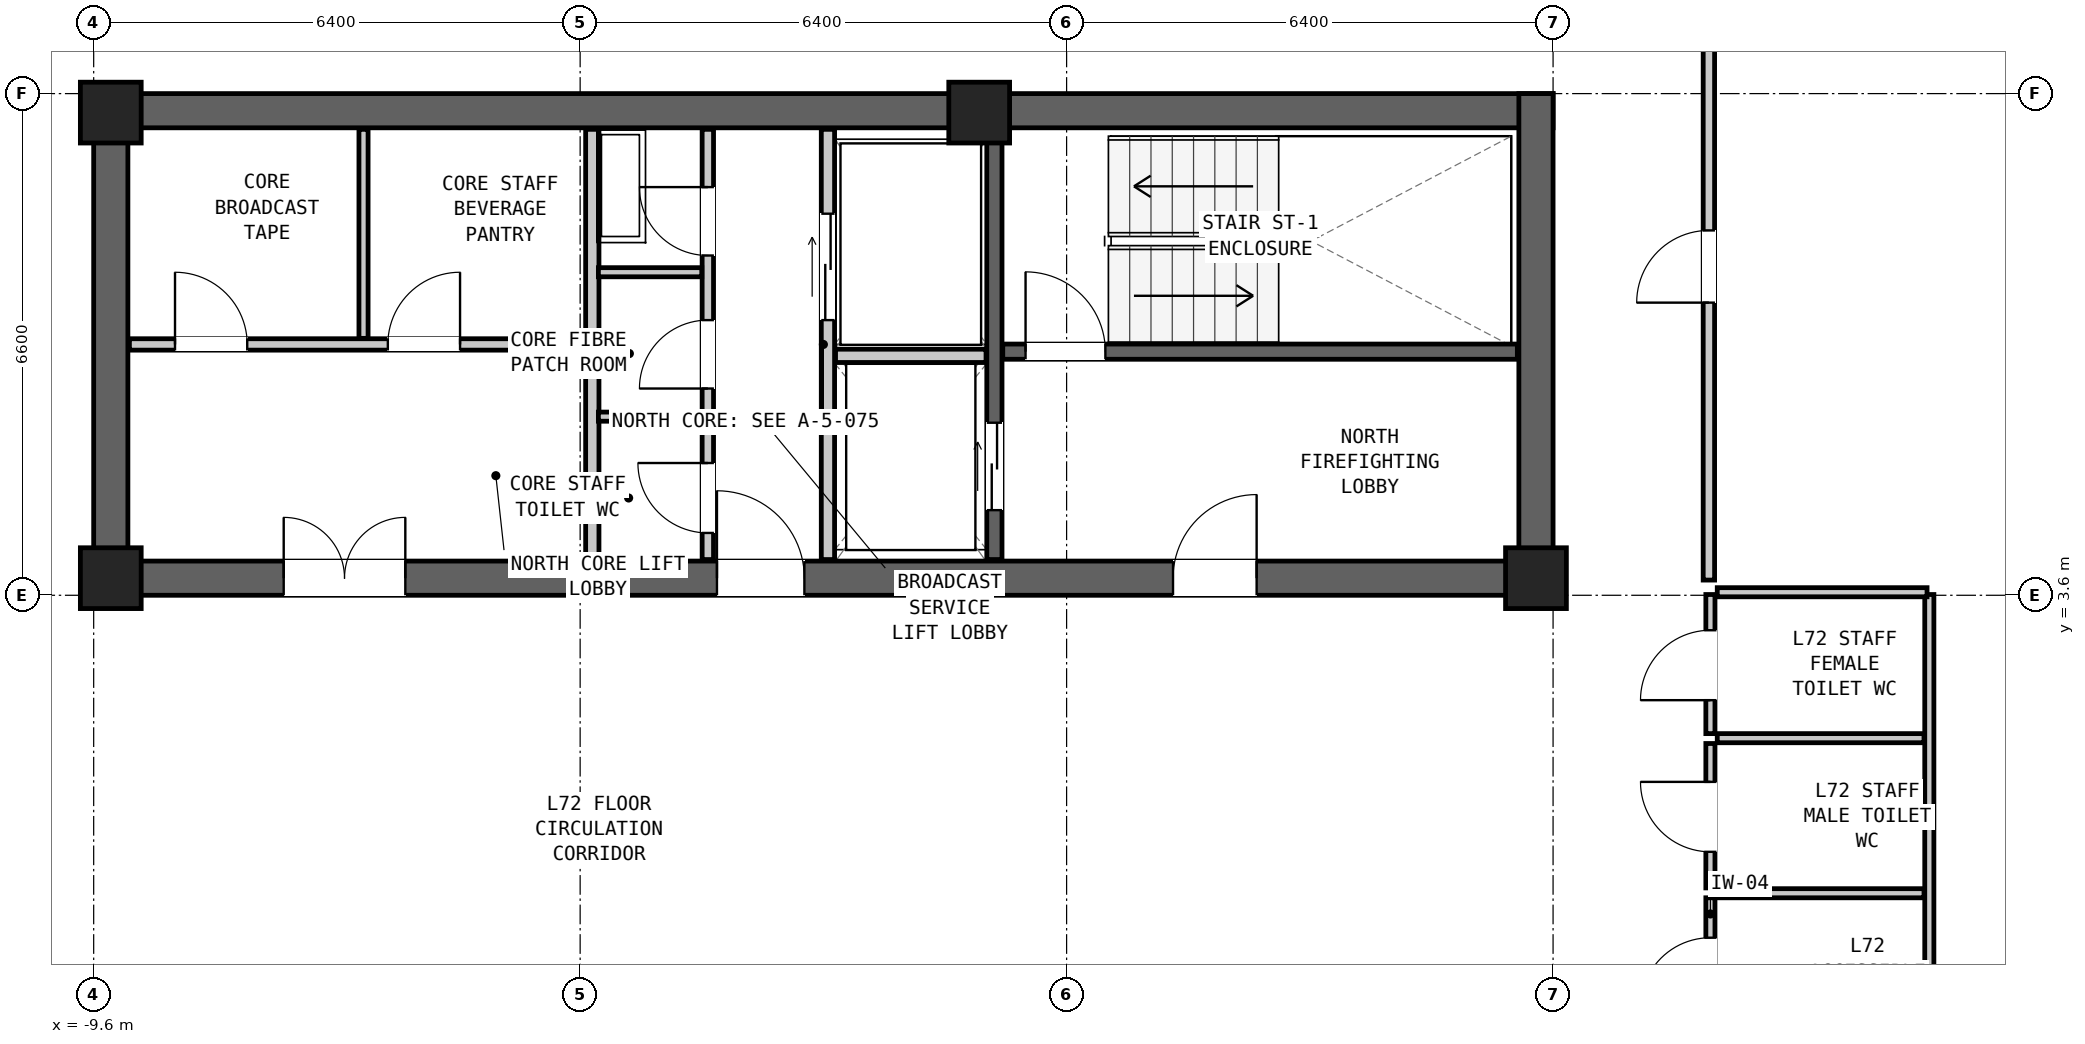
"""IFC4 building model, lengths in metres.
Left out: names, types, materials, properties, quantities, classifications, styles, units other than length and angle.
Written with IfcOpenShell. Run it as: python <this file> out.ifc"""

import sys

from ifc_helpers import new_model, si_unit, direction, frame, frame_2d, origin, origin_2d, place, context, subcontext, project, spatial, rectangle, extrude, element, fill, save


model = new_model("IFC4")
c1 = context("Model", 3, precision=1e-05, world=origin(), true_north=direction((0.0, 1.0)))
c2 = subcontext(c1, "Body", "Model", "MODEL_VIEW")
j1 = project(units=[si_unit("LENGTHUNIT", "METRE"), si_unit("PLANEANGLEUNIT", "RADIAN")], contexts=[c1])
p1 = place(None, origin())
s1 = spatial("IfcSite", under=j1, at=p1, CompositionType="ELEMENT")
p2 = place(p1, origin())
s2 = spatial("IfcBuilding", under=s1, at=p2, CompositionType="ELEMENT")
p3 = place(p2, frame((0.0, 0.0, 245.9)))
s3 = spatial("IfcBuildingStorey", under=s2, at=p3, CompositionType="ELEMENT", Elevation=245.9)
p4 = place(p3, frame((-9.6, 9.975, 0.0), z_axis=(0.0, 0.0, 1.0), x_axis=(1.0, 0.0, 0.0)))
e1 = element("IfcWall", 1, at=p4, inside=s3, PredefinedType="SHEAR", context=c2, shape_type="SweptSolid", body=[
    extrude(rectangle(XDim=19.2, YDim=0.45, at=frame_2d((9.6, 0.0))), origin(), (0.0, 0.0, 1.0), 3.05),
])
p5 = place(p3, frame((-9.6, 3.825, 0.0), z_axis=(0.0, 0.0, 1.0), x_axis=(1.0, 0.0, 0.0)))
e2 = element("IfcWall", 2, at=p5, inside=s3, PredefinedType="SHEAR", context=c2, shape_type="SweptSolid", body=[
    extrude(rectangle(XDim=19.2, YDim=0.45, at=frame_2d((9.6, 0.0))), origin(), (0.0, 0.0, 1.0), 3.05),
])
p6 = place(p5, frame((14.2, 0.0, 0.0)))
e3 = element("IfcOpeningElement", 3, at=p6, cuts=e2, PredefinedType="OPENING", context=c2, shape_type="SweptSolid", body=[
    extrude(rectangle(XDim=1.1, YDim=2.08, at=frame_2d((0.55, 1.04))), frame((0.0, 0.237, 0.0), z_axis=(0.0, -1.0, 0.0), x_axis=(1.0, 0.0, 0.0)), (0.0, 0.0, 1.0), 0.474),
])
p7 = place(p5, frame((8.2, 0.0, 0.0)))
e4 = element("IfcOpeningElement", 4, at=p7, cuts=e2, PredefinedType="OPENING", context=c2, shape_type="SweptSolid", body=[
    extrude(rectangle(XDim=1.15, YDim=2.1, at=frame_2d((0.575, 1.05))), frame((0.0, 0.237, 0.0), z_axis=(0.0, -1.0, 0.0), x_axis=(1.0, 0.0, 0.0)), (0.0, 0.0, 1.0), 0.474),
])
p8 = place(p5, frame((2.5, 0.0, 0.0)))
e5 = element("IfcOpeningElement", 5, at=p8, cuts=e2, PredefinedType="OPENING", context=c2, shape_type="SweptSolid", body=[
    extrude(rectangle(XDim=1.6, YDim=2.12, at=frame_2d((0.8, 1.06))), frame((0.0, 0.237, 0.0), z_axis=(0.0, -1.0, 0.0), x_axis=(1.0, 0.0, 0.0)), (0.0, 0.0, 1.0), 0.474),
])
for number, where, z_axis, x_axis in (
    (6, (-9.375, 3.6, 0.0), (0.0, 0.0, 1.0), (0.0, 1.0, 0.0)),
    (7, (9.375, 3.6, 0.0), (0.0, 0.0, 1.0), (0.0, 1.0, 0.0)),
):
    element("IfcWall", number, at=place(p3, frame(where, z_axis=z_axis, x_axis=x_axis)), inside=s3, PredefinedType="SHEAR", context=c2, shape_type="SweptSolid", body=[
        extrude(rectangle(XDim=6.6, YDim=0.45, at=frame_2d((3.3, 0.0))), origin(), (0.0, 0.0, 1.0), 3.05),
    ])
for number, where, z_axis, x_axis in (
    (8, (-9.375, 9.95, 0.0), (0.0, 0.0, 1.0), (1.0, 0.0, 0.0)),
    (9, (2.05, 9.95, 0.0), (0.0, 0.0, 1.0), (1.0, 0.0, 0.0)),
    (10, (-9.375, 3.825, 0.0), (0.0, 0.0, 1.0), (1.0, 0.0, 0.0)),
    (11, (9.375, 3.825, 0.0), (0.0, 0.0, 1.0), (1.0, 0.0, 0.0)),
):
    element("IfcColumn", number, at=place(p3, frame(where, z_axis=z_axis, x_axis=x_axis)), inside=s3, PredefinedType="COLUMN", context=c2, shape_type="SweptSolid", body=[
        extrude(rectangle(XDim=0.8, YDim=0.8, at=origin_2d()), origin(), (0.0, 0.0, 1.0), 3.05),
    ])
p9 = place(p3, frame((2.36, 6.805, 0.0), z_axis=(0.0, 0.0, 1.0), x_axis=(1.0, 0.0, 0.0)))
e12 = element("IfcWall", 12, at=p9, inside=s3, PredefinedType="SHEAR", context=c2, shape_type="SweptSolid", body=[
    extrude(rectangle(XDim=6.77, YDim=0.2, at=frame_2d((3.385, 0.0))), origin(), (0.0, 0.0, 1.0), 2.86),
])
p10 = place(p9, frame((0.3, 0.0, 0.0)))
e13 = element("IfcOpeningElement", 13, at=p10, cuts=e12, PredefinedType="OPENING", context=c2, shape_type="SweptSolid", body=[
    extrude(rectangle(XDim=1.05, YDim=2.08, at=frame_2d((0.525, 1.04))), frame((0.0, 0.112, 0.0), z_axis=(0.0, -1.0, 0.0), x_axis=(1.0, 0.0, 0.0)), (0.0, 0.0, 1.0), 0.224),
])
p11 = place(p3, frame((2.25, 4.07, 0.0), z_axis=(0.0, 0.0, 1.0), x_axis=(0.0, 1.0, 0.0)))
e14 = element("IfcWall", 14, at=p11, inside=s3, PredefinedType="SHEAR", context=c2, shape_type="SweptSolid", body=[
    extrude(rectangle(XDim=5.66, YDim=0.2, at=frame_2d((2.83, 0.0))), origin(), (0.0, 0.0, 1.0), 2.86),
])
p12 = place(p11, frame((0.65, 0.0, 0.0)))
e15 = element("IfcOpeningElement", 15, at=p12, cuts=e14, PredefinedType="OPENING", context=c2, shape_type="SweptSolid", body=[
    extrude(rectangle(XDim=1.15, YDim=2.08, at=frame_2d((0.575, 1.04))), frame((0.0, 0.112, 0.0), z_axis=(0.0, -1.0, 0.0), x_axis=(1.0, 0.0, 0.0)), (0.0, 0.0, 1.0), 0.224),
])
p13 = place(p3, frame((0.06, 4.07, 0.0), z_axis=(0.0, 0.0, 1.0), x_axis=(0.0, 1.0, 0.0)))
e16 = element("IfcWall", 16, at=p13, inside=s3, PredefinedType="PARTITIONING", context=c2, shape_type="SweptSolid", body=[
    extrude(rectangle(XDim=5.66, YDim=0.175, at=frame_2d((2.83, 0.0))), origin(), (0.0, 0.0, 1.0), 2.86),
])
p14 = place(p13, frame((3.15, 0.0, 0.0)))
e17 = element("IfcOpeningElement", 17, at=p14, cuts=e16, PredefinedType="OPENING", context=c2, shape_type="SweptSolid", body=[
    extrude(rectangle(XDim=1.4, YDim=2.12, at=frame_2d((0.7, 1.06))), frame((0.0, 0.1, 0.0), z_axis=(0.0, -1.0, 0.0), x_axis=(1.0, 0.0, 0.0)), (0.0, 0.0, 1.0), 0.199),
])
p15 = place(p3, frame((0.16, 6.75, 0.0), z_axis=(0.0, 0.0, 1.0), x_axis=(1.0, 0.0, 0.0)))
e18 = element("IfcWall", 18, at=p15, inside=s3, PredefinedType="PARTITIONING", context=c2, shape_type="SweptSolid", body=[
    extrude(rectangle(XDim=1.98, YDim=0.175, at=frame_2d((0.99, 0.0))), origin(), (0.0, 0.0, 1.0), 2.86),
])
p16 = place(p3, frame((-3.04, 4.07, 0.0), z_axis=(0.0, 0.0, 1.0), x_axis=(0.0, 1.0, 0.0)))
e19 = element("IfcWall", 19, at=p16, inside=s3, PredefinedType="PARTITIONING", context=c2, shape_type="SweptSolid", body=[
    extrude(rectangle(XDim=5.66, YDim=0.175, at=frame_2d((2.83, 0.0))), origin(), (0.0, 0.0, 1.0), 2.86),
])
p17 = place(p3, frame((-1.52, 4.07, 0.0), z_axis=(0.0, 0.0, 1.0), x_axis=(0.0, 1.0, 0.0)))
e20 = element("IfcWall", 20, at=p17, inside=s3, PredefinedType="PARTITIONING", context=c2, shape_type="SweptSolid", body=[
    extrude(rectangle(XDim=5.66, YDim=0.15, at=frame_2d((2.83, 0.0))), origin(), (0.0, 0.0, 1.0), 2.86),
])
p18 = place(p17, frame((4.0, 0.0, 0.0)))
e21 = element("IfcOpeningElement", 21, at=p18, cuts=e20, PredefinedType="OPENING", context=c2, shape_type="SweptSolid", body=[
    extrude(rectangle(XDim=0.9, YDim=2.05, at=frame_2d((0.45, 1.025))), frame((0.0, 0.087, 0.0), z_axis=(0.0, -1.0, 0.0), x_axis=(1.0, 0.0, 0.0)), (0.0, 0.0, 1.0), 0.174),
])
p19 = place(p17, frame((2.25, 0.0, 0.0)))
e22 = element("IfcOpeningElement", 22, at=p19, cuts=e20, PredefinedType="OPENING", context=c2, shape_type="SweptSolid", body=[
    extrude(rectangle(XDim=0.9, YDim=2.05, at=frame_2d((0.45, 1.025))), frame((0.0, 0.087, 0.0), z_axis=(0.0, -1.0, 0.0), x_axis=(1.0, 0.0, 0.0)), (0.0, 0.0, 1.0), 0.174),
])
p20 = place(p17, frame((0.35, 0.0, 0.0)))
e23 = element("IfcOpeningElement", 23, at=p20, cuts=e20, PredefinedType="OPENING", context=c2, shape_type="SweptSolid", body=[
    extrude(rectangle(XDim=0.92, YDim=2.1, at=frame_2d((0.46, 1.05))), frame((0.0, 0.087, 0.0), z_axis=(0.0, -1.0, 0.0), x_axis=(1.0, 0.0, 0.0)), (0.0, 0.0, 1.0), 0.174),
])
for number, where, z_axis, x_axis in (
    (24, (-2.96, 5.95, 0.0), (0.0, 0.0, 1.0), (1.0, 0.0, 0.0)),
    (25, (-2.96, 7.85, 0.0), (0.0, 0.0, 1.0), (1.0, 0.0, 0.0)),
):
    element("IfcWall", number, at=place(p3, frame(where, z_axis=z_axis, x_axis=x_axis)), inside=s3, PredefinedType="PARTITIONING", context=c2, shape_type="SweptSolid", body=[
        extrude(rectangle(XDim=1.36, YDim=0.12, at=frame_2d((0.68, 0.0))), origin(), (0.0, 0.0, 1.0), 2.86),
    ])
p21 = place(p3, frame((-9.13, 6.9, 0.0), z_axis=(0.0, 0.0, 1.0), x_axis=(1.0, 0.0, 0.0)))
e26 = element("IfcWall", 26, at=p21, inside=s3, PredefinedType="PARTITIONING", context=c2, shape_type="SweptSolid", body=[
    extrude(rectangle(XDim=6.01, YDim=0.15, at=frame_2d((3.005, 0.0))), origin(), (0.0, 0.0, 1.0), 2.86),
])
p22 = place(p21, frame((0.6, 0.0, 0.0)))
e27 = element("IfcOpeningElement", 27, at=p22, cuts=e26, PredefinedType="OPENING", context=c2, shape_type="SweptSolid", body=[
    extrude(rectangle(XDim=0.95, YDim=2.1, at=frame_2d((0.475, 1.05))), frame((0.0, 0.087, 0.0), z_axis=(0.0, -1.0, 0.0), x_axis=(1.0, 0.0, 0.0)), (0.0, 0.0, 1.0), 0.174),
])
p23 = place(p21, frame((3.4, 0.0, 0.0)))
e28 = element("IfcOpeningElement", 28, at=p23, cuts=e26, PredefinedType="OPENING", context=c2, shape_type="SweptSolid", body=[
    extrude(rectangle(XDim=0.95, YDim=2.1, at=frame_2d((0.475, 1.05))), frame((0.0, 0.087, 0.0), z_axis=(0.0, -1.0, 0.0), x_axis=(1.0, 0.0, 0.0)), (0.0, 0.0, 1.0), 0.174),
])
p24 = place(p3, frame((-6.05, 6.98, 0.0), z_axis=(0.0, 0.0, 1.0), x_axis=(0.0, 1.0, 0.0)))
e29 = element("IfcWall", 29, at=p24, inside=s3, PredefinedType="PARTITIONING", context=c2, shape_type="SweptSolid", body=[
    extrude(rectangle(XDim=2.75, YDim=0.12, at=frame_2d((1.375, 0.0))), origin(), (0.0, 0.0, 1.0), 2.86),
])
p25 = place(p3, frame((11.67, -2.32, 0.0), z_axis=(0.0, 0.0, 1.0), x_axis=(0.0, 1.0, 0.0)))
e30 = element("IfcWall", 30, at=p25, inside=s3, PredefinedType="PARTITIONING", context=c2, shape_type="SweptSolid", body=[
    extrude(rectangle(XDim=1.94, YDim=0.12, at=frame_2d((0.97, 0.0))), origin(), (0.0, 0.0, 1.0), 2.86),
])
p26 = place(p25, frame((0.495, 0.0, 0.0)))
e31 = element("IfcOpeningElement", 31, at=p26, cuts=e30, PredefinedType="OPENING", context=c2, shape_type="SweptSolid", body=[
    extrude(rectangle(XDim=0.92, YDim=2.1, at=frame_2d((0.46, 1.05))), frame((0.0, 0.072, 0.0), z_axis=(0.0, -1.0, 0.0), x_axis=(1.0, 0.0, 0.0)), (0.0, 0.0, 1.0), 0.144),
])
p27 = place(p3, frame((11.67, -0.25, 0.0), z_axis=(0.0, 0.0, 1.0), x_axis=(0.0, 1.0, 0.0)))
e32 = element("IfcWall", 32, at=p27, inside=s3, PredefinedType="PARTITIONING", context=c2, shape_type="SweptSolid", body=[
    extrude(rectangle(XDim=1.9, YDim=0.12, at=frame_2d((0.95, 0.0))), origin(), (0.0, 0.0, 1.0), 2.86),
])
p28 = place(p27, frame((0.475, 0.0, 0.0)))
e33 = element("IfcOpeningElement", 33, at=p28, cuts=e32, PredefinedType="OPENING", context=c2, shape_type="SweptSolid", body=[
    extrude(rectangle(XDim=0.92, YDim=2.1, at=frame_2d((0.46, 1.05))), frame((0.0, 0.072, 0.0), z_axis=(0.0, -1.0, 0.0), x_axis=(1.0, 0.0, 0.0)), (0.0, 0.0, 1.0), 0.144),
])
p29 = place(p3, frame((11.67, 1.78, 0.0), z_axis=(0.0, 0.0, 1.0), x_axis=(0.0, 1.0, 0.0)))
e34 = element("IfcWall", 34, at=p29, inside=s3, PredefinedType="PARTITIONING", context=c2, shape_type="SweptSolid", body=[
    extrude(rectangle(XDim=1.83, YDim=0.12, at=frame_2d((0.915, 0.0))), origin(), (0.0, 0.0, 1.0), 2.86),
])
p30 = place(p29, frame((0.44, 0.0, 0.0)))
e35 = element("IfcOpeningElement", 35, at=p30, cuts=e34, PredefinedType="OPENING", context=c2, shape_type="SweptSolid", body=[
    extrude(rectangle(XDim=0.92, YDim=2.1, at=frame_2d((0.46, 1.05))), frame((0.0, 0.072, 0.0), z_axis=(0.0, -1.0, 0.0), x_axis=(1.0, 0.0, 0.0)), (0.0, 0.0, 1.0), 0.144),
])
p31 = place(p3, frame((14.55, -2.32, 0.0), z_axis=(0.0, 0.0, 1.0), x_axis=(0.0, 1.0, 0.0)))
e36 = element("IfcWall", 36, at=p31, inside=s3, PredefinedType="PARTITIONING", context=c2, shape_type="SweptSolid", body=[
    extrude(rectangle(XDim=5.93, YDim=0.12, at=frame_2d((2.965, 0.0))), origin(), (0.0, 0.0, 1.0), 2.86),
])
p32 = place(p3, frame((11.76, 3.64, 0.0), z_axis=(0.0, 0.0, 1.0), x_axis=(1.0, 0.0, 0.0)))
e37 = element("IfcWall", 37, at=p32, inside=s3, PredefinedType="PARTITIONING", context=c2, shape_type="SweptSolid", body=[
    extrude(rectangle(XDim=2.76, YDim=0.12, at=frame_2d((1.38, 0.0))), origin(), (0.0, 0.0, 1.0), 1.981),
])
for number, where, z_axis, x_axis in (
    (38, (11.76, -0.32, 0.0), (0.0, 0.0, 1.0), (1.0, 0.0, 0.0)),
    (39, (11.76, 1.72, 0.0), (0.0, 0.0, 1.0), (1.0, 0.0, 0.0)),
):
    element("IfcWall", number, at=place(p3, frame(where, z_axis=z_axis, x_axis=x_axis)), inside=s3, PredefinedType="PARTITIONING", context=c2, shape_type="SweptSolid", body=[
        extrude(rectangle(XDim=2.72, YDim=0.12, at=frame_2d((1.36, 0.0))), origin(), (0.0, 0.0, 1.0), 2.86),
    ])
p33 = place(p3, frame((11.65, 3.8, 0.0), z_axis=(0.0, 0.0, 1.0), x_axis=(0.0, 1.0, 0.0)))
e40 = element("IfcWall", 40, at=p33, inside=s3, PredefinedType="PARTITIONING", context=c2, shape_type="SweptSolid", body=[
    extrude(rectangle(XDim=8.25, YDim=0.15, at=frame_2d((4.125, 0.0))), origin(), (0.0, 0.0, 1.0), 2.86),
])
p34 = place(p33, frame((3.65, 0.0, 0.0)))
e41 = element("IfcOpeningElement", 41, at=p34, cuts=e40, PredefinedType="OPENING", context=c2, shape_type="SweptSolid", body=[
    extrude(rectangle(XDim=0.95, YDim=2.1, at=frame_2d((0.475, 1.05))), frame((0.0, 0.087, 0.0), z_axis=(0.0, -1.0, 0.0), x_axis=(1.0, 0.0, 0.0)), (0.0, 0.0, 1.0), 0.174),
])
p35 = place(p10, origin())
e42 = element("IfcDoor", 42, at=p35, inside=s3, OperationType="SINGLE_SWING_LEFT", PredefinedType="DOOR", context=c2, shape_type="SweptSolid", body=[
    extrude(rectangle(XDim=1.05, YDim=2.08, at=frame_2d((0.525, 1.04))), frame((0.0, 0.025, 0.0), z_axis=(0.0, -1.0, 0.0), x_axis=(1.0, 0.0, 0.0)), (0.0, 0.0, 1.0), 0.05),
])
fill(e13, e42)
p36 = place(p6, origin())
e43 = element("IfcDoor", 43, at=p36, inside=s3, OperationType="SINGLE_SWING_RIGHT", PredefinedType="DOOR", context=c2, shape_type="SweptSolid", body=[
    extrude(rectangle(XDim=1.1, YDim=2.08, at=frame_2d((0.55, 1.04))), frame((0.0, 0.025, 0.0), z_axis=(0.0, -1.0, 0.0), x_axis=(1.0, 0.0, 0.0)), (0.0, 0.0, 1.0), 0.05),
])
fill(e3, e43)
p37 = place(p12, origin())
e44 = element("IfcDoor", 44, at=p37, inside=s3, OperationType="DOUBLE_DOOR_SLIDING", PredefinedType="DOOR", context=c2, shape_type="SweptSolid", body=[
    extrude(rectangle(XDim=1.15, YDim=2.08, at=frame_2d((0.575, 1.04))), frame((0.0, 0.025, 0.0), z_axis=(0.0, -1.0, 0.0), x_axis=(1.0, 0.0, 0.0)), (0.0, 0.0, 1.0), 0.05),
])
fill(e15, e44)
p38 = place(p14, origin())
e45 = element("IfcDoor", 45, at=p38, inside=s3, OperationType="DOUBLE_DOOR_SLIDING", PredefinedType="DOOR", context=c2, shape_type="SweptSolid", body=[
    extrude(rectangle(XDim=1.4, YDim=2.12, at=frame_2d((0.7, 1.06))), frame((0.0, 0.025, 0.0), z_axis=(0.0, -1.0, 0.0), x_axis=(1.0, 0.0, 0.0)), (0.0, 0.0, 1.0), 0.05),
])
fill(e17, e45)
p39 = place(p7, origin())
e46 = element("IfcDoor", 46, at=p39, inside=s3, OperationType="SINGLE_SWING_LEFT", PredefinedType="DOOR", context=c2, shape_type="SweptSolid", body=[
    extrude(rectangle(XDim=1.15, YDim=2.1, at=frame_2d((0.575, 1.05))), frame((0.0, 0.025, 0.0), z_axis=(0.0, -1.0, 0.0), x_axis=(1.0, 0.0, 0.0)), (0.0, 0.0, 1.0), 0.05),
])
fill(e4, e46)
p40 = place(p18, origin())
e47 = element("IfcDoor", 47, at=p40, inside=s3, OperationType="SINGLE_SWING_RIGHT", PredefinedType="DOOR", context=c2, shape_type="SweptSolid", body=[
    extrude(rectangle(XDim=0.9, YDim=2.05, at=frame_2d((0.45, 1.025))), frame((0.0, 0.025, 0.0), z_axis=(0.0, -1.0, 0.0), x_axis=(1.0, 0.0, 0.0)), (0.0, 0.0, 1.0), 0.05),
])
fill(e21, e47)
p41 = place(p19, origin())
e48 = element("IfcDoor", 48, at=p41, inside=s3, OperationType="SINGLE_SWING_LEFT", PredefinedType="DOOR", context=c2, shape_type="SweptSolid", body=[
    extrude(rectangle(XDim=0.9, YDim=2.05, at=frame_2d((0.45, 1.025))), frame((0.0, 0.025, 0.0), z_axis=(0.0, -1.0, 0.0), x_axis=(1.0, 0.0, 0.0)), (0.0, 0.0, 1.0), 0.05),
])
fill(e22, e48)
p42 = place(p20, origin())
e49 = element("IfcDoor", 49, at=p42, inside=s3, OperationType="SINGLE_SWING_RIGHT", PredefinedType="DOOR", context=c2, shape_type="SweptSolid", body=[
    extrude(rectangle(XDim=0.92, YDim=2.1, at=frame_2d((0.46, 1.05))), frame((0.0, 0.025, 0.0), z_axis=(0.0, -1.0, 0.0), x_axis=(1.0, 0.0, 0.0)), (0.0, 0.0, 1.0), 0.05),
])
fill(e23, e49)
p43 = place(p8, origin())
e50 = element("IfcDoor", 50, at=p43, inside=s3, OperationType="DOUBLE_DOOR_SINGLE_SWING", PredefinedType="DOOR", context=c2, shape_type="SweptSolid", body=[
    extrude(rectangle(XDim=1.6, YDim=2.12, at=frame_2d((0.8, 1.06))), frame((0.0, 0.025, 0.0), z_axis=(0.0, -1.0, 0.0), x_axis=(1.0, 0.0, 0.0)), (0.0, 0.0, 1.0), 0.05),
])
fill(e5, e50)
p44 = place(p22, origin())
e51 = element("IfcDoor", 51, at=p44, inside=s3, OperationType="SINGLE_SWING_LEFT", PredefinedType="DOOR", context=c2, shape_type="SweptSolid", body=[
    extrude(rectangle(XDim=0.95, YDim=2.1, at=frame_2d((0.475, 1.05))), frame((0.0, 0.025, 0.0), z_axis=(0.0, -1.0, 0.0), x_axis=(1.0, 0.0, 0.0)), (0.0, 0.0, 1.0), 0.05),
])
fill(e27, e51)
p45 = place(p23, origin())
e52 = element("IfcDoor", 52, at=p45, inside=s3, OperationType="SINGLE_SWING_RIGHT", PredefinedType="DOOR", context=c2, shape_type="SweptSolid", body=[
    extrude(rectangle(XDim=0.95, YDim=2.1, at=frame_2d((0.475, 1.05))), frame((0.0, 0.025, 0.0), z_axis=(0.0, -1.0, 0.0), x_axis=(1.0, 0.0, 0.0)), (0.0, 0.0, 1.0), 0.05),
])
fill(e28, e52)
p46 = place(p26, origin())
e53 = element("IfcDoor", 53, at=p46, inside=s3, OperationType="SINGLE_SWING_LEFT", PredefinedType="DOOR", context=c2, shape_type="SweptSolid", body=[
    extrude(rectangle(XDim=0.92, YDim=2.1, at=frame_2d((0.46, 1.05))), frame((0.0, 0.025, 0.0), z_axis=(0.0, -1.0, 0.0), x_axis=(1.0, 0.0, 0.0)), (0.0, 0.0, 1.0), 0.05),
])
fill(e31, e53)
p47 = place(p28, origin())
e54 = element("IfcDoor", 54, at=p47, inside=s3, OperationType="SINGLE_SWING_RIGHT", PredefinedType="DOOR", context=c2, shape_type="SweptSolid", body=[
    extrude(rectangle(XDim=0.92, YDim=2.1, at=frame_2d((0.46, 1.05))), frame((0.0, 0.025, 0.0), z_axis=(0.0, -1.0, 0.0), x_axis=(1.0, 0.0, 0.0)), (0.0, 0.0, 1.0), 0.05),
])
fill(e33, e54)
p48 = place(p30, origin())
e55 = element("IfcDoor", 55, at=p48, inside=s3, OperationType="SINGLE_SWING_LEFT", PredefinedType="DOOR", context=c2, shape_type="SweptSolid", body=[
    extrude(rectangle(XDim=0.92, YDim=2.1, at=frame_2d((0.46, 1.05))), frame((0.0, 0.025, 0.0), z_axis=(0.0, -1.0, 0.0), x_axis=(1.0, 0.0, 0.0)), (0.0, 0.0, 1.0), 0.05),
])
fill(e35, e55)
p49 = place(p34, origin())
e56 = element("IfcDoor", 56, at=p49, inside=s3, OperationType="SINGLE_SWING_LEFT", PredefinedType="DOOR", context=c2, shape_type="SweptSolid", body=[
    extrude(rectangle(XDim=0.95, YDim=2.1, at=frame_2d((0.475, 1.05))), frame((0.0, 0.025, 0.0), z_axis=(0.0, -1.0, 0.0), x_axis=(1.0, 0.0, 0.0)), (0.0, 0.0, 1.0), 0.05),
])
fill(e41, e56)
save(model, sys.argv[1])
